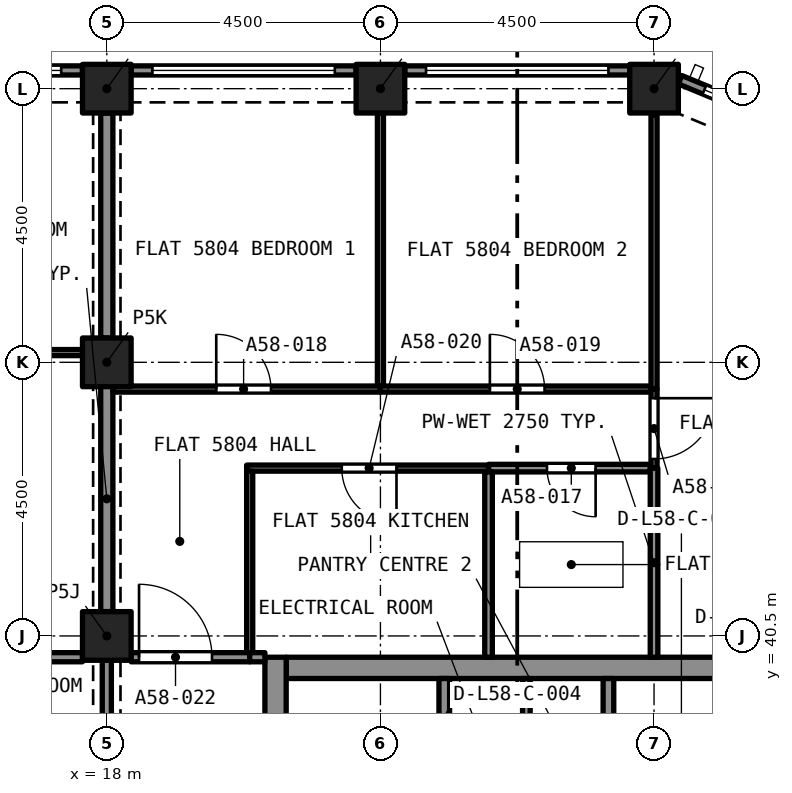
"""IFC4 building model, lengths in metres.
Left out: names, types, materials, properties, quantities, classifications, styles, units other than length and angle.
Written with IfcOpenShell. Run it as: python <this file> out.ifc"""

import sys

from ifc_helpers import new_model, si_unit, direction, frame, frame_2d, origin, origin_2d, place, context, subcontext, project, spatial, rectangle, extrude, element, fill, save


model = new_model("IFC4")
c1 = context("Model", 3, precision=1e-05, world=origin(), true_north=direction((0.0, 1.0)))
c2 = subcontext(c1, "Body", "Model", "MODEL_VIEW")
j1 = project(units=[si_unit("LENGTHUNIT", "METRE"), si_unit("PLANEANGLEUNIT", "RADIAN")], contexts=[c1])
p1 = place(None, origin())
s1 = spatial("IfcSite", under=j1, at=p1, CompositionType="ELEMENT")
p2 = place(p1, origin())
s2 = spatial("IfcBuilding", under=s1, at=p2, CompositionType="ELEMENT")
p3 = place(p2, frame((0.0, 0.0, 210.095)))
s3 = spatial("IfcBuildingStorey", under=s2, at=p3, CompositionType="ELEMENT", Elevation=210.095)
for number, where, z_axis, x_axis in (
    (1, (18.0, 40.5, 0.0), (0.0, 0.0, 1.0), (1.0, 0.0, 0.0)),
    (2, (18.0, 45.0, 0.0), (0.0, 0.0, 1.0), (1.0, 0.0, 0.0)),
    (3, (18.0, 49.5, 0.0), (0.0, 0.0, 1.0), (1.0, 0.0, 0.0)),
    (4, (22.5, 49.5, 0.0), (0.0, 0.0, 1.0), (1.0, 0.0, 0.0)),
    (5, (27.0, 49.5, 0.0), (0.0, 0.0, 1.0), (1.0, 0.0, 0.0)),
):
    element("IfcColumn", number, at=place(p3, frame(where, z_axis=z_axis, x_axis=x_axis)), inside=s3, PredefinedType="COLUMN", context=c2, shape_type="SweptSolid", body=[
        extrude(rectangle(XDim=0.8, YDim=0.8, at=origin_2d()), origin(), (0.0, 0.0, 1.0), 3.2),
    ])
p4 = place(p3, frame((20.95, 39.975, 0.0), z_axis=(0.0, 0.0, 1.0), x_axis=(1.0, 0.0, 0.0)))
e6 = element("IfcWall", 6, at=p4, inside=s3, PredefinedType="SOLIDWALL", context=c2, shape_type="SweptSolid", body=[
    extrude(rectangle(XDim=7.6, YDim=0.35, at=frame_2d((3.8, 0.0))), origin(), (0.0, 0.0, 1.0), 3.2),
])
p5 = place(p3, frame((20.775, 27.35, 0.0), z_axis=(0.0, 0.0, 1.0), x_axis=(0.0, 1.0, 0.0)))
e7 = element("IfcWall", 7, at=p5, inside=s3, PredefinedType="SOLIDWALL", context=c2, shape_type="SweptSolid", body=[
    extrude(rectangle(XDim=12.8, YDim=0.35, at=frame_2d((6.4, 0.0))), origin(), (0.0, 0.0, 1.0), 3.2),
])
p6 = place(p5, frame((8.6, 0.0, 0.0)))
e8 = element("IfcOpeningElement", 8, at=p6, cuts=e7, PredefinedType="OPENING", context=c2, shape_type="SweptSolid", body=[
    extrude(rectangle(XDim=1.2, YDim=2.1, at=frame_2d((0.6, 1.05))), frame((0.0, 0.185, 0.0), z_axis=(0.0, -1.0, 0.0), x_axis=(1.0, 0.0, 0.0)), (0.0, 0.0, 1.0), 0.37),
])
p7 = place(p3, frame((27.429, 49.647, 0.0), z_axis=(0.0, 0.0, 1.0), x_axis=(0.923885342263, -0.382669406082, 0.0)))
e9 = element("IfcWall", 9, at=p7, inside=s3, PredefinedType="SOLIDWALL", context=c2, shape_type="SweptSolid", body=[
    extrude(rectangle(XDim=2.602, YDim=0.15, at=frame_2d((1.301, 0.0))), origin(), (0.0, 0.0, 1.0), 3.2),
])
p8 = place(p7, frame((0.432, 0.0, 0.45)))
e10 = element("IfcOpeningElement", 10, at=p8, cuts=e9, PredefinedType="OPENING", context=c2, shape_type="SweptSolid", body=[
    extrude(rectangle(XDim=1.9, YDim=1.95, at=frame_2d((0.95, 0.975))), frame((0.0, 0.085, 0.0), z_axis=(0.0, -1.0, 0.0), x_axis=(1.0, 0.0, 0.0)), (0.0, 0.0, 1.0), 0.17),
])
p9 = place(p3, frame((22.9, 49.8, 0.0), z_axis=(0.0, 0.0, 1.0), x_axis=(1.0, 0.0, 0.0)))
e11 = element("IfcWall", 11, at=p9, inside=s3, PredefinedType="SOLIDWALL", context=c2, shape_type="SweptSolid", body=[
    extrude(rectangle(XDim=3.7, YDim=0.15, at=frame_2d((1.85, 0.0))), origin(), (0.0, 0.0, 1.0), 3.2),
])
p10 = place(p9, frame((0.35, 0.0, 0.45)))
e12 = element("IfcOpeningElement", 12, at=p10, cuts=e11, PredefinedType="OPENING", context=c2, shape_type="SweptSolid", body=[
    extrude(rectangle(XDim=3.0, YDim=1.95, at=frame_2d((1.5, 0.975))), frame((0.0, 0.085, 0.0), z_axis=(0.0, -1.0, 0.0), x_axis=(1.0, 0.0, 0.0)), (0.0, 0.0, 1.0), 0.17),
])
p11 = place(p3, frame((18.4, 49.8, 0.0), z_axis=(0.0, 0.0, 1.0), x_axis=(1.0, 0.0, 0.0)))
e13 = element("IfcWall", 13, at=p11, inside=s3, PredefinedType="SOLIDWALL", context=c2, shape_type="SweptSolid", body=[
    extrude(rectangle(XDim=3.7, YDim=0.15, at=frame_2d((1.85, 0.0))), origin(), (0.0, 0.0, 1.0), 3.2),
])
p12 = place(p11, frame((0.35, 0.0, 0.45)))
e14 = element("IfcOpeningElement", 14, at=p12, cuts=e13, PredefinedType="OPENING", context=c2, shape_type="SweptSolid", body=[
    extrude(rectangle(XDim=3.0, YDim=1.95, at=frame_2d((1.5, 0.975))), frame((0.0, 0.085, 0.0), z_axis=(0.0, -1.0, 0.0), x_axis=(1.0, 0.0, 0.0)), (0.0, 0.0, 1.0), 0.17),
])
p13 = place(p3, frame((13.9, 49.8, 0.0), z_axis=(0.0, 0.0, 1.0), x_axis=(1.0, 0.0, 0.0)))
e15 = element("IfcWall", 15, at=p13, inside=s3, PredefinedType="SOLIDWALL", context=c2, shape_type="SweptSolid", body=[
    extrude(rectangle(XDim=3.7, YDim=0.15, at=frame_2d((1.85, 0.0))), origin(), (0.0, 0.0, 1.0), 3.2),
])
p14 = place(p13, frame((0.35, 0.0, 0.45)))
e16 = element("IfcOpeningElement", 16, at=p14, cuts=e15, PredefinedType="OPENING", context=c2, shape_type="SweptSolid", body=[
    extrude(rectangle(XDim=3.0, YDim=1.95, at=frame_2d((1.5, 0.975))), frame((0.0, 0.085, 0.0), z_axis=(0.0, -1.0, 0.0), x_axis=(1.0, 0.0, 0.0)), (0.0, 0.0, 1.0), 0.17),
])
p15 = place(p3, frame((13.5, 45.16, 0.0), z_axis=(0.0, 0.0, 1.0), x_axis=(1.0, 0.0, 0.0)))
e17 = element("IfcWall", 17, at=p15, inside=s3, PredefinedType="PARTITIONING", context=c2, shape_type="SweptSolid", body=[
    extrude(rectangle(XDim=4.1, YDim=0.1, at=frame_2d((2.05, 0.0))), origin(), (0.0, 0.0, 1.0), 2.9),
])
p16 = place(p15, frame((1.8, 0.0, 0.0)))
e18 = element("IfcOpeningElement", 18, at=p16, cuts=e17, PredefinedType="OPENING", context=c2, shape_type="SweptSolid", body=[
    extrude(rectangle(XDim=0.9, YDim=2.1, at=frame_2d((0.45, 1.05))), frame((0.0, 0.06, 0.0), z_axis=(0.0, -1.0, 0.0), x_axis=(1.0, 0.0, 0.0)), (0.0, 0.0, 1.0), 0.12),
])
p17 = place(p3, frame((18.0, 45.4, 0.0), z_axis=(0.0, 0.0, 1.0), x_axis=(0.0, 1.0, 0.0)))
e19 = element("IfcWall", 19, at=p17, inside=s3, PredefinedType="PARTITIONING", context=c2, shape_type="SweptSolid", body=[
    extrude(rectangle(XDim=3.7, YDim=0.2, at=frame_2d((1.85, 0.0))), origin(), (0.0, 0.0, 1.0), 2.38),
])
p18 = place(p3, frame((18.0, 40.9, 0.0), z_axis=(0.0, 0.0, 1.0), x_axis=(0.0, 1.0, 0.0)))
e20 = element("IfcWall", 20, at=p18, inside=s3, PredefinedType="PARTITIONING", context=c2, shape_type="SweptSolid", body=[
    extrude(rectangle(XDim=3.71, YDim=0.2, at=frame_2d((1.855, 0.0))), origin(), (0.0, 0.0, 1.0), 2.38),
])
p19 = place(p3, frame((14.95, 40.15, 0.0), z_axis=(0.0, 0.0, 1.0), x_axis=(1.0, 0.0, 0.0)))
e21 = element("IfcWall", 21, at=p19, inside=s3, PredefinedType="PARTITIONING", context=c2, shape_type="SweptSolid", body=[
    extrude(rectangle(XDim=2.65, YDim=0.15, at=frame_2d((1.325, 0.0))), origin(), (0.0, 0.0, 1.0), 2.9),
])
p20 = place(p19, frame((0.2, 0.0, 0.0)))
e22 = element("IfcOpeningElement", 22, at=p20, cuts=e21, PredefinedType="OPENING", context=c2, shape_type="SweptSolid", body=[
    extrude(rectangle(XDim=1.2, YDim=2.4, at=frame_2d((0.6, 1.2))), frame((0.0, 0.085, 0.0), z_axis=(0.0, -1.0, 0.0), x_axis=(1.0, 0.0, 0.0)), (0.0, 0.0, 1.0), 0.17),
])
p21 = place(p3, frame((26.938, 43.26, 0.0), z_axis=(0.0, 0.0, 1.0), x_axis=(-1.0, 0.0, 0.0)))
e23 = element("IfcWall", 23, at=p21, inside=s3, PredefinedType="PARTITIONING", context=c2, shape_type="SweptSolid", body=[
    extrude(rectangle(XDim=2.659, YDim=0.125, at=frame_2d((1.33, 0.0))), origin(), (0.0, 0.0, 1.0), 2.75),
])
p22 = place(p21, frame((0.898, 0.0, 0.0)))
e24 = element("IfcOpeningElement", 24, at=p22, cuts=e23, PredefinedType="OPENING", context=c2, shape_type="SweptSolid", body=[
    extrude(rectangle(XDim=0.8, YDim=2.1, at=frame_2d((0.4, 1.05))), frame((0.0, 0.073, 0.0), z_axis=(0.0, -1.0, 0.0), x_axis=(1.0, 0.0, 0.0)), (0.0, 0.0, 1.0), 0.145),
])
p23 = place(p3, frame((24.278, 40.15, 0.0), z_axis=(0.0, 0.0, 1.0), x_axis=(0.0, 1.0, 0.0)))
e25 = element("IfcWall", 25, at=p23, inside=s3, PredefinedType="PARTITIONING", context=c2, shape_type="SweptSolid", body=[
    extrude(rectangle(XDim=3.048, YDim=0.125, at=frame_2d((1.524, 0.0))), origin(), (0.0, 0.0, 1.0), 2.75),
])
p24 = place(p3, frame((27.0, 40.15, 0.0), z_axis=(0.0, 0.0, 1.0), x_axis=(0.0, 1.0, 0.0)))
e26 = element("IfcWall", 26, at=p24, inside=s3, PredefinedType="PARTITIONING", context=c2, shape_type="SweptSolid", body=[
    extrude(rectangle(XDim=3.11, YDim=0.125, at=frame_2d((1.555, 0.0))), origin(), (0.0, 0.0, 1.0), 2.75),
])
p25 = place(p3, frame((22.5, 44.61, 0.0), z_axis=(0.0, 0.0, 1.0), x_axis=(0.0, 1.0, 0.0)))
e27 = element("IfcWall", 27, at=p25, inside=s3, PredefinedType="PARTITIONING", context=c2, shape_type="SweptSolid", body=[
    extrude(rectangle(XDim=4.49, YDim=0.1, at=frame_2d((2.245, 0.0))), origin(), (0.0, 0.0, 1.0), 2.75),
])
p26 = place(p3, frame((18.1, 44.56, 0.0), z_axis=(0.0, 0.0, 1.0), x_axis=(1.0, 0.0, 0.0)))
e28 = element("IfcWall", 28, at=p26, inside=s3, PredefinedType="PARTITIONING", context=c2, shape_type="SweptSolid", body=[
    extrude(rectangle(XDim=4.4, YDim=0.1, at=frame_2d((2.2, 0.0))), origin(), (0.0, 0.0, 1.0), 2.75),
])
p27 = place(p26, frame((1.7, 0.0, 0.0)))
e29 = element("IfcOpeningElement", 29, at=p27, cuts=e28, PredefinedType="OPENING", context=c2, shape_type="SweptSolid", body=[
    extrude(rectangle(XDim=0.9, YDim=2.1, at=frame_2d((0.45, 1.05))), frame((0.0, 0.06, 0.0), z_axis=(0.0, -1.0, 0.0), x_axis=(1.0, 0.0, 0.0)), (0.0, 0.0, 1.0), 0.12),
])
p28 = place(p3, frame((22.5, 44.56, 0.0), z_axis=(0.0, 0.0, 1.0), x_axis=(1.0, 0.0, 0.0)))
e30 = element("IfcWall", 30, at=p28, inside=s3, PredefinedType="PARTITIONING", context=c2, shape_type="SweptSolid", body=[
    extrude(rectangle(XDim=4.45, YDim=0.1, at=frame_2d((2.225, 0.0))), origin(), (0.0, 0.0, 1.0), 2.75),
])
p29 = place(p28, frame((1.8, 0.0, 0.0)))
e31 = element("IfcOpeningElement", 31, at=p29, cuts=e30, PredefinedType="OPENING", context=c2, shape_type="SweptSolid", body=[
    extrude(rectangle(XDim=0.9, YDim=2.1, at=frame_2d((0.45, 1.05))), frame((0.0, 0.06, 0.0), z_axis=(0.0, -1.0, 0.0), x_axis=(1.0, 0.0, 0.0)), (0.0, 0.0, 1.0), 0.12),
])
p30 = place(p3, frame((27.0, 44.56, 0.0), z_axis=(0.0, 0.0, 1.0), x_axis=(0.0, 1.0, 0.0)))
e32 = element("IfcWall", 32, at=p30, inside=s3, PredefinedType="PARTITIONING", context=c2, shape_type="SweptSolid", body=[
    extrude(rectangle(XDim=4.507, YDim=0.1, at=frame_2d((2.253, 0.0))), origin(), (0.0, 0.0, 1.0), 2.75),
])
p31 = place(p3, frame((24.278, 43.26, 0.0), z_axis=(0.0, 0.0, 1.0), x_axis=(-1.0, 0.0, 0.0)))
e33 = element("IfcWall", 33, at=p31, inside=s3, PredefinedType="PARTITIONING", context=c2, shape_type="SweptSolid", body=[
    extrude(rectangle(XDim=3.978, YDim=0.1, at=frame_2d((1.989, 0.0))), origin(), (0.0, 0.0, 1.0), 2.75),
])
p32 = place(p31, frame((1.514, 0.0, 0.0)))
e34 = element("IfcOpeningElement", 34, at=p32, cuts=e33, PredefinedType="OPENING", context=c2, shape_type="SweptSolid", body=[
    extrude(rectangle(XDim=0.9, YDim=2.1, at=frame_2d((0.45, 1.05))), frame((0.0, 0.06, 0.0), z_axis=(0.0, -1.0, 0.0), x_axis=(1.0, 0.0, 0.0)), (0.0, 0.0, 1.0), 0.12),
])
p33 = place(p3, frame((20.35, 40.225, 0.0), z_axis=(0.0, 0.0, 1.0), x_axis=(0.0, 1.0, 0.0)))
e35 = element("IfcWall", 35, at=p33, inside=s3, PredefinedType="PARTITIONING", context=c2, shape_type="SweptSolid", body=[
    extrude(rectangle(XDim=2.985, YDim=0.1, at=frame_2d((1.492, 0.0))), origin(), (0.0, 0.0, 1.0), 2.75),
])
p34 = place(p3, frame((27.0, 44.56, 0.0), z_axis=(0.0, 0.0, 1.0), x_axis=(0.0, -1.0, 0.0)))
e36 = element("IfcWall", 36, at=p34, inside=s3, PredefinedType="PARTITIONING", context=c2, shape_type="SweptSolid", body=[
    extrude(rectangle(XDim=1.3, YDim=0.1, at=frame_2d((0.65, 0.0))), origin(), (0.0, 0.0, 1.0), 2.75),
])
p35 = place(p34, frame((0.15, 0.0, 0.0)))
e37 = element("IfcOpeningElement", 37, at=p35, cuts=e36, PredefinedType="OPENING", context=c2, shape_type="SweptSolid", body=[
    extrude(rectangle(XDim=1.0, YDim=2.1, at=frame_2d((0.5, 1.05))), frame((0.0, 0.06, 0.0), z_axis=(0.0, -1.0, 0.0), x_axis=(1.0, 0.0, 0.0)), (0.0, 0.0, 1.0), 0.12),
])
p36 = place(p3, frame((18.4, 40.15, 0.0), z_axis=(0.0, 0.0, 1.0), x_axis=(1.0, 0.0, 0.0)))
e38 = element("IfcWall", 38, at=p36, inside=s3, PredefinedType="PARTITIONING", context=c2, shape_type="SweptSolid", body=[
    extrude(rectangle(XDim=1.95, YDim=0.15, at=frame_2d((0.975, 0.0))), origin(), (0.0, 0.0, 1.0), 2.75),
])
p37 = place(p36, frame((0.13, 0.0, 0.0)))
e39 = element("IfcOpeningElement", 39, at=p37, cuts=e38, PredefinedType="OPENING", context=c2, shape_type="SweptSolid", body=[
    extrude(rectangle(XDim=1.2, YDim=2.4, at=frame_2d((0.6, 1.2))), frame((0.0, 0.085, 0.0), z_axis=(0.0, -1.0, 0.0), x_axis=(1.0, 0.0, 0.0)), (0.0, 0.0, 1.0), 0.17),
])
p38 = place(p3, frame((20.35, 40.15, 0.0), z_axis=(0.0, 0.0, 1.0), x_axis=(1.0, 0.0, 0.0)))
e40 = element("IfcWall", 40, at=p38, inside=s3, PredefinedType="PARTITIONING", context=c2, shape_type="SweptSolid", body=[
    extrude(rectangle(XDim=0.25, YDim=0.15, at=frame_2d((0.125, 0.0))), origin(), (0.0, 0.0, 1.0), 2.75),
])
p39 = place(p3, frame((18.0, 40.1, 0.0), z_axis=(0.0, 0.0, 1.0), x_axis=(0.0, -1.0, 0.0)))
e41 = element("IfcWall", 41, at=p39, inside=s3, PredefinedType="PARTITIONING", context=c2, shape_type="SweptSolid", body=[
    extrude(rectangle(XDim=3.7, YDim=0.15, at=frame_2d((1.85, 0.0))), origin(), (0.0, 0.0, 1.0), 2.38),
])
p40 = place(p39, frame((1.25, 0.0, 0.0)))
e42 = element("IfcOpeningElement", 42, at=p40, cuts=e41, PredefinedType="OPENING", context=c2, shape_type="SweptSolid", body=[
    extrude(rectangle(XDim=1.2, YDim=2.1, at=frame_2d((0.6, 1.05))), frame((0.0, 0.085, 0.0), z_axis=(0.0, -1.0, 0.0), x_axis=(1.0, 0.0, 0.0)), (0.0, 0.0, 1.0), 0.17),
])
for number, where, z_axis, x_axis in (
    (43, (23.55, 37.5, 0.0), (0.0, 0.0, 1.0), (0.0, 1.0, 0.0)),
    (44, (26.25, 37.5, 0.0), (0.0, 0.0, 1.0), (0.0, 1.0, 0.0)),
):
    element("IfcWall", number, at=place(p3, frame(where, z_axis=z_axis, x_axis=x_axis)), inside=s3, PredefinedType="SOLIDWALL", context=c2, shape_type="SweptSolid", body=[
        extrude(rectangle(XDim=2.3, YDim=0.175, at=frame_2d((1.15, 0.0))), origin(), (0.0, 0.0, 1.0), 2.9),
    ])
p41 = place(p3, frame((24.9, 37.5, 0.0), z_axis=(0.0, 0.0, 1.0), x_axis=(0.0, 1.0, 0.0)))
e45 = element("IfcWall", 45, at=p41, inside=s3, PredefinedType="PARTITIONING", context=c2, shape_type="SweptSolid", body=[
    extrude(rectangle(XDim=2.3, YDim=0.125, at=frame_2d((1.15, 0.0))), origin(), (0.0, 0.0, 1.0), 2.9),
])
p42 = place(p8, origin())
e46 = element("IfcWindow", 46, at=p42, inside=s3, PartitioningType="SINGLE_PANEL", PredefinedType="WINDOW", context=c2, shape_type="SweptSolid", body=[
    extrude(rectangle(XDim=1.9, YDim=1.95, at=frame_2d((0.95, 0.975))), frame((0.0, 0.03, 0.0), z_axis=(0.0, -1.0, 0.0), x_axis=(1.0, 0.0, 0.0)), (0.0, 0.0, 1.0), 0.06),
])
fill(e10, e46)
p43 = place(p10, origin())
e47 = element("IfcWindow", 47, at=p43, inside=s3, PartitioningType="SINGLE_PANEL", PredefinedType="WINDOW", context=c2, shape_type="SweptSolid", body=[
    extrude(rectangle(XDim=3.0, YDim=1.95, at=frame_2d((1.5, 0.975))), frame((0.0, 0.03, 0.0), z_axis=(0.0, -1.0, 0.0), x_axis=(1.0, 0.0, 0.0)), (0.0, 0.0, 1.0), 0.06),
])
fill(e12, e47)
p44 = place(p12, origin())
e48 = element("IfcWindow", 48, at=p44, inside=s3, PartitioningType="SINGLE_PANEL", PredefinedType="WINDOW", context=c2, shape_type="SweptSolid", body=[
    extrude(rectangle(XDim=3.0, YDim=1.95, at=frame_2d((1.5, 0.975))), frame((0.0, 0.03, 0.0), z_axis=(0.0, -1.0, 0.0), x_axis=(1.0, 0.0, 0.0)), (0.0, 0.0, 1.0), 0.06),
])
fill(e14, e48)
p45 = place(p14, origin())
e49 = element("IfcWindow", 49, at=p45, inside=s3, PartitioningType="SINGLE_PANEL", PredefinedType="WINDOW", context=c2, shape_type="SweptSolid", body=[
    extrude(rectangle(XDim=3.0, YDim=1.95, at=frame_2d((1.5, 0.975))), frame((0.0, 0.03, 0.0), z_axis=(0.0, -1.0, 0.0), x_axis=(1.0, 0.0, 0.0)), (0.0, 0.0, 1.0), 0.06),
])
fill(e16, e49)
p46 = place(p22, origin())
e50 = element("IfcDoor", 50, at=p46, inside=s3, OperationType="SINGLE_SWING_LEFT", PredefinedType="DOOR", context=c2, shape_type="SweptSolid", body=[
    extrude(rectangle(XDim=0.8, YDim=2.1, at=frame_2d((0.4, 1.05))), frame((0.0, 0.025, 0.0), z_axis=(0.0, -1.0, 0.0), x_axis=(1.0, 0.0, 0.0)), (0.0, 0.0, 1.0), 0.05),
])
fill(e24, e50)
p47 = place(p27, origin())
e51 = element("IfcDoor", 51, at=p47, inside=s3, OperationType="SINGLE_SWING_LEFT", PredefinedType="DOOR", context=c2, shape_type="SweptSolid", body=[
    extrude(rectangle(XDim=0.9, YDim=2.1, at=frame_2d((0.45, 1.05))), frame((0.0, 0.025, 0.0), z_axis=(0.0, -1.0, 0.0), x_axis=(1.0, 0.0, 0.0)), (0.0, 0.0, 1.0), 0.05),
])
fill(e29, e51)
p48 = place(p29, origin())
e52 = element("IfcDoor", 52, at=p48, inside=s3, OperationType="SINGLE_SWING_RIGHT", PredefinedType="DOOR", context=c2, shape_type="SweptSolid", body=[
    extrude(rectangle(XDim=0.9, YDim=2.1, at=frame_2d((0.45, 1.05))), frame((0.0, 0.025, 0.0), z_axis=(0.0, -1.0, 0.0), x_axis=(1.0, 0.0, 0.0)), (0.0, 0.0, 1.0), 0.05),
])
fill(e31, e52)
p49 = place(p32, origin())
e53 = element("IfcDoor", 53, at=p49, inside=s3, OperationType="SINGLE_SWING_LEFT", PredefinedType="DOOR", context=c2, shape_type="SweptSolid", body=[
    extrude(rectangle(XDim=0.9, YDim=2.1, at=frame_2d((0.45, 1.05))), frame((0.0, 0.025, 0.0), z_axis=(0.0, -1.0, 0.0), x_axis=(1.0, 0.0, 0.0)), (0.0, 0.0, 1.0), 0.05),
])
fill(e34, e53)
p50 = place(p35, origin())
e54 = element("IfcDoor", 54, at=p50, inside=s3, OperationType="SINGLE_SWING_LEFT", PredefinedType="DOOR", context=c2, shape_type="SweptSolid", body=[
    extrude(rectangle(XDim=1.0, YDim=2.1, at=frame_2d((0.5, 1.05))), frame((0.0, 0.025, 0.0), z_axis=(0.0, -1.0, 0.0), x_axis=(1.0, 0.0, 0.0)), (0.0, 0.0, 1.0), 0.05),
])
fill(e37, e54)
p51 = place(p37, origin())
e55 = element("IfcDoor", 55, at=p51, inside=s3, OperationType="SINGLE_SWING_LEFT", PredefinedType="DOOR", context=c2, shape_type="SweptSolid", body=[
    extrude(rectangle(XDim=1.2, YDim=2.4, at=frame_2d((0.6, 1.2))), frame((0.0, 0.025, 0.0), z_axis=(0.0, -1.0, 0.0), x_axis=(1.0, 0.0, 0.0)), (0.0, 0.0, 1.0), 0.05),
])
fill(e39, e55)
save(model, sys.argv[1])
